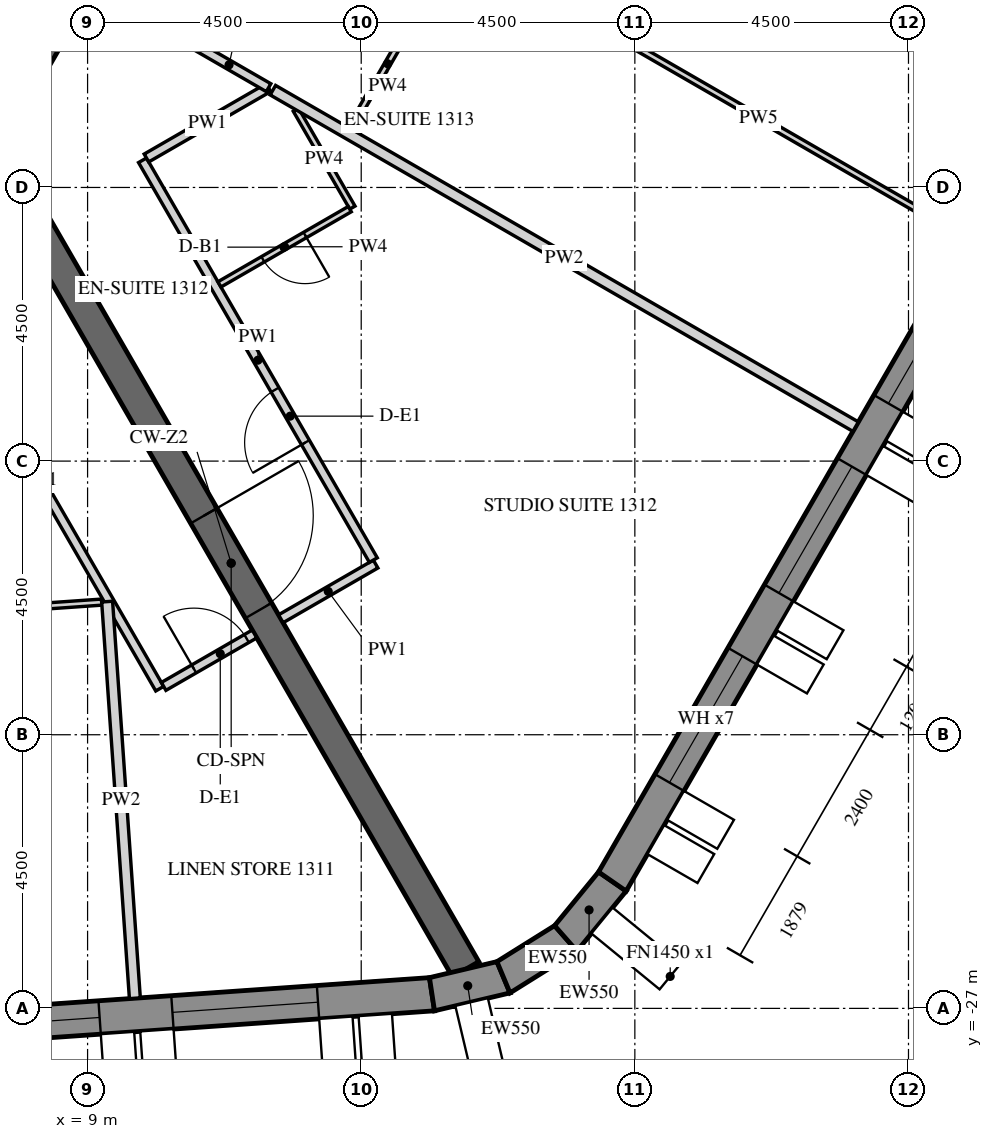
"""IFC4 building model, lengths in metres.
Left out: names, types, materials, properties, quantities, classifications, styles, units other than length and angle.
Written with IfcOpenShell. Run it as: python <this file> out.ifc"""

import sys

from ifc_helpers import new_model, si_unit, direction, frame, frame_2d, origin, place, context, subcontext, project, spatial, polyline, rectangle, outline, extrude, element, fill, save


model = new_model("IFC4")
c1 = context("Model", 3, precision=1e-05, world=origin(), true_north=direction((0.0, 1.0)))
c2 = subcontext(c1, "Body", "Model", "MODEL_VIEW")
j1 = project(units=[si_unit("LENGTHUNIT", "METRE"), si_unit("PLANEANGLEUNIT", "RADIAN")], contexts=[c1])
p1 = place(None, origin())
s1 = spatial("IfcSite", under=j1, at=p1, CompositionType="ELEMENT")
p2 = place(p1, origin())
s2 = spatial("IfcBuilding", under=s1, at=p2, CompositionType="ELEMENT")
p3 = place(p2, frame((0.0, 0.0, 176.1)))
s3 = spatial("IfcBuildingStorey", under=s2, at=p3, CompositionType="ELEMENT", Elevation=176.1)
p4 = place(p3, frame((-13.026, -28.704, -0.15), z_axis=(0.0, 0.0, 1.0), x_axis=(0.99756406806, 0.069756219185, 0.0)))
e1 = element("IfcWall", 1, at=p4, inside=s3, PredefinedType="SOLIDWALL", context=c2, shape_type="SweptSolid", body=[
    extrude(outline(polyline([(-0.026, -0.275), (27.78, -0.275), (27.735, 0.275), (0.026, 0.275), (-0.026, -0.275)])), origin(), (0.0, 0.0, 1.0), 3.9),
])
p5 = place(p4, frame((1.879, 0.0, 1.05)))
e2 = element("IfcOpeningElement", 2, at=p5, cuts=e1, PredefinedType="OPENING", context=c2, shape_type="SweptSolid", body=[
    extrude(rectangle(XDim=2.4, YDim=2.4, at=frame_2d((1.2, 1.2))), frame((0.0, 0.285, 0.0), z_axis=(0.0, -1.0, 0.0), x_axis=(1.0, 0.0, 0.0)), (0.0, 0.0, 1.0), 0.57),
])
p6 = place(p4, frame((5.479, 0.0, 1.05)))
e3 = element("IfcOpeningElement", 3, at=p6, cuts=e1, PredefinedType="OPENING", context=c2, shape_type="SweptSolid", body=[
    extrude(rectangle(XDim=2.4, YDim=2.4, at=frame_2d((1.2, 1.2))), frame((0.0, 0.285, 0.0), z_axis=(0.0, -1.0, 0.0), x_axis=(1.0, 0.0, 0.0)), (0.0, 0.0, 1.0), 0.57),
])
p7 = place(p4, frame((9.079, 0.0, 1.05)))
e4 = element("IfcOpeningElement", 4, at=p7, cuts=e1, PredefinedType="OPENING", context=c2, shape_type="SweptSolid", body=[
    extrude(rectangle(XDim=2.4, YDim=2.4, at=frame_2d((1.2, 1.2))), frame((0.0, 0.285, 0.0), z_axis=(0.0, -1.0, 0.0), x_axis=(1.0, 0.0, 0.0)), (0.0, 0.0, 1.0), 0.57),
])
p8 = place(p4, frame((12.679, 0.0, 1.05)))
e5 = element("IfcOpeningElement", 5, at=p8, cuts=e1, PredefinedType="OPENING", context=c2, shape_type="SweptSolid", body=[
    extrude(rectangle(XDim=2.4, YDim=2.4, at=frame_2d((1.2, 1.2))), frame((0.0, 0.285, 0.0), z_axis=(0.0, -1.0, 0.0), x_axis=(1.0, 0.0, 0.0)), (0.0, 0.0, 1.0), 0.57),
])
p9 = place(p4, frame((16.279, 0.0, 1.05)))
e6 = element("IfcOpeningElement", 6, at=p9, cuts=e1, PredefinedType="OPENING", context=c2, shape_type="SweptSolid", body=[
    extrude(rectangle(XDim=2.4, YDim=2.4, at=frame_2d((1.2, 1.2))), frame((0.0, 0.285, 0.0), z_axis=(0.0, -1.0, 0.0), x_axis=(1.0, 0.0, 0.0)), (0.0, 0.0, 1.0), 0.57),
])
p10 = place(p4, frame((19.879, 0.0, 1.05)))
e7 = element("IfcOpeningElement", 7, at=p10, cuts=e1, PredefinedType="OPENING", context=c2, shape_type="SweptSolid", body=[
    extrude(rectangle(XDim=2.4, YDim=2.4, at=frame_2d((1.2, 1.2))), frame((0.0, 0.285, 0.0), z_axis=(0.0, -1.0, 0.0), x_axis=(1.0, 0.0, 0.0)), (0.0, 0.0, 1.0), 0.57),
])
p11 = place(p4, frame((23.479, 0.0, 1.05)))
e8 = element("IfcOpeningElement", 8, at=p11, cuts=e1, PredefinedType="OPENING", context=c2, shape_type="SweptSolid", body=[
    extrude(rectangle(XDim=2.4, YDim=2.4, at=frame_2d((1.2, 1.2))), frame((0.0, 0.285, 0.0), z_axis=(0.0, -1.0, 0.0), x_axis=(1.0, 0.0, 0.0)), (0.0, 0.0, 1.0), 0.57),
])
p12 = place(p3, frame((14.664, -26.767, -0.15), z_axis=(0.0, 0.0, 1.0), x_axis=(0.973063591128, 0.230536868247, 0.0)))
e9 = element("IfcWall", 9, at=p12, inside=s3, PredefinedType="SOLIDWALL", context=c2, shape_type="SweptSolid", body=[
    extrude(outline(polyline([(-0.022, -0.275), (1.253, -0.275), (1.163, 0.275), (0.022, 0.275), (-0.022, -0.275)])), origin(), (0.0, 0.0, 1.0), 3.9),
])
p13 = place(p3, frame((15.84, -26.489, -0.15), z_axis=(0.0, 0.0, 1.0), x_axis=(0.848009655012, 0.52998077796, 0.0)))
e10 = element("IfcWall", 10, at=p13, inside=s3, PredefinedType="SOLIDWALL", context=c2, shape_type="SweptSolid", body=[
    extrude(outline(polyline([(-0.045, -0.275), (1.253, -0.275), (1.163, 0.275), (0.045, 0.275), (-0.045, -0.275)])), origin(), (0.0, 0.0, 1.0), 3.9),
])
p14 = place(p3, frame((16.864, -25.848, -0.15), z_axis=(0.0, 0.0, 1.0), x_axis=(0.633842757806, 0.773461930787, 0.0)))
e11 = element("IfcWall", 11, at=p14, inside=s3, PredefinedType="SOLIDWALL", context=c2, shape_type="SweptSolid", body=[
    extrude(outline(polyline([(-0.045, -0.275), (1.231, -0.275), (1.186, 0.275), (0.045, 0.275), (-0.045, -0.275)])), origin(), (0.0, 0.0, 1.0), 3.9),
])
p15 = place(p3, frame((17.63, -24.914, -0.15), z_axis=(0.0, 0.0, 1.0), x_axis=(0.499998569178, 0.866026229868, 0.0)))
e12 = element("IfcWall", 12, at=p15, inside=s3, PredefinedType="SOLIDWALL", context=c2, shape_type="SweptSolid", body=[
    extrude(outline(polyline([(-0.022, -0.275), (27.783, -0.275), (27.732, 0.275), (0.022, 0.275), (-0.022, -0.275)])), origin(), (0.0, 0.0, 1.0), 3.9),
])
p16 = place(p15, frame((1.879, 0.0, 1.05)))
e13 = element("IfcOpeningElement", 13, at=p16, cuts=e12, PredefinedType="OPENING", context=c2, shape_type="SweptSolid", body=[
    extrude(rectangle(XDim=2.4, YDim=2.4, at=frame_2d((1.2, 1.2))), frame((0.0, 0.285, 0.0), z_axis=(0.0, -1.0, 0.0), x_axis=(1.0, 0.0, 0.0)), (0.0, 0.0, 1.0), 0.57),
])
p17 = place(p15, frame((5.479, 0.0, 1.05)))
e14 = element("IfcOpeningElement", 14, at=p17, cuts=e12, PredefinedType="OPENING", context=c2, shape_type="SweptSolid", body=[
    extrude(rectangle(XDim=2.4, YDim=2.4, at=frame_2d((1.2, 1.2))), frame((0.0, 0.285, 0.0), z_axis=(0.0, -1.0, 0.0), x_axis=(1.0, 0.0, 0.0)), (0.0, 0.0, 1.0), 0.57),
])
p18 = place(p15, frame((9.079, 0.0, 1.05)))
e15 = element("IfcOpeningElement", 15, at=p18, cuts=e12, PredefinedType="OPENING", context=c2, shape_type="SweptSolid", body=[
    extrude(rectangle(XDim=2.4, YDim=2.4, at=frame_2d((1.2, 1.2))), frame((0.0, 0.285, 0.0), z_axis=(0.0, -1.0, 0.0), x_axis=(1.0, 0.0, 0.0)), (0.0, 0.0, 1.0), 0.57),
])
p19 = place(p15, frame((12.679, 0.0, 1.05)))
e16 = element("IfcOpeningElement", 16, at=p19, cuts=e12, PredefinedType="OPENING", context=c2, shape_type="SweptSolid", body=[
    extrude(rectangle(XDim=2.4, YDim=2.4, at=frame_2d((1.2, 1.2))), frame((0.0, 0.285, 0.0), z_axis=(0.0, -1.0, 0.0), x_axis=(1.0, 0.0, 0.0)), (0.0, 0.0, 1.0), 0.57),
])
p20 = place(p15, frame((16.279, 0.0, 1.05)))
e17 = element("IfcOpeningElement", 17, at=p20, cuts=e12, PredefinedType="OPENING", context=c2, shape_type="SweptSolid", body=[
    extrude(rectangle(XDim=2.4, YDim=2.4, at=frame_2d((1.2, 1.2))), frame((0.0, 0.285, 0.0), z_axis=(0.0, -1.0, 0.0), x_axis=(1.0, 0.0, 0.0)), (0.0, 0.0, 1.0), 0.57),
])
p21 = place(p15, frame((19.879, 0.0, 1.05)))
e18 = element("IfcOpeningElement", 18, at=p21, cuts=e12, PredefinedType="OPENING", context=c2, shape_type="SweptSolid", body=[
    extrude(rectangle(XDim=2.4, YDim=2.4, at=frame_2d((1.2, 1.2))), frame((0.0, 0.285, 0.0), z_axis=(0.0, -1.0, 0.0), x_axis=(1.0, 0.0, 0.0)), (0.0, 0.0, 1.0), 0.57),
])
p22 = place(p15, frame((23.479, 0.0, 1.05)))
e19 = element("IfcOpeningElement", 19, at=p22, cuts=e12, PredefinedType="OPENING", context=c2, shape_type="SweptSolid", body=[
    extrude(rectangle(XDim=2.4, YDim=2.4, at=frame_2d((1.2, 1.2))), frame((0.0, 0.285, 0.0), z_axis=(0.0, -1.0, 0.0), x_axis=(1.0, 0.0, 0.0)), (0.0, 0.0, 1.0), 0.57),
])
p23 = place(p3, frame((7.361, -12.75, -0.15), z_axis=(0.0, 0.0, 1.0), x_axis=(0.50000571537, 0.866022103989, 0.0)))
e20 = element("IfcWall", 20, at=p23, inside=s3, PredefinedType="SHEAR", context=c2, shape_type="SweptSolid", body=[
    extrude(outline(polyline([(-0.144, -0.25), (14.867, -0.25), (14.578, 0.25), (0.144, 0.25), (-0.144, -0.25)])), origin(), (0.0, 0.0, 1.0), 3.9),
])
p24 = place(p23, frame((6.49, 0.0, 0.15)))
e21 = element("IfcOpeningElement", 21, at=p24, cuts=e20, PredefinedType="OPENING", context=c2, shape_type="SweptSolid", body=[
    extrude(rectangle(XDim=1.8, YDim=2.4, at=frame_2d((0.9, 1.2))), frame((0.0, 0.26, 0.0), z_axis=(0.0, -1.0, 0.0), x_axis=(1.0, 0.0, 0.0)), (0.0, 0.0, 1.0), 0.52),
])
p25 = place(p3, frame((7.506, -13.0, -0.15), z_axis=(0.0, 0.0, 1.0), x_axis=(0.499988271576, -0.866032175087, 0.0)))
e22 = element("IfcWall", 22, at=p25, inside=s3, PredefinedType="SHEAR", context=c2, shape_type="SweptSolid", body=[
    extrude(rectangle(XDim=15.424, YDim=0.5, at=frame_2d((7.712, 0.0))), origin(), (0.0, 0.0, 1.0), 3.9),
])
p26 = place(p25, frame((6.812, 0.0, 0.15)))
e23 = element("IfcOpeningElement", 23, at=p26, cuts=e22, PredefinedType="OPENING", context=c2, shape_type="SweptSolid", body=[
    extrude(rectangle(XDim=1.8, YDim=2.4, at=frame_2d((0.9, 1.2))), frame((0.0, 0.26, 0.0), z_axis=(0.0, -1.0, 0.0), x_axis=(1.0, 0.0, 0.0)), (0.0, 0.0, 1.0), 0.52),
])
p27 = place(p3, frame((6.221, -14.875, 0.0), z_axis=(0.0, 0.0, 1.0), x_axis=(0.499989830942, -0.866031274813, 0.0)))
e24 = element("IfcWall", 24, at=p27, inside=s3, PredefinedType="PARTITIONING", context=c2, shape_type="SweptSolid", body=[
    extrude(rectangle(XDim=7.93, YDim=0.15, at=frame_2d((3.965, 0.0))), origin(), (0.0, 0.0, 1.0), 2.988),
])
p28 = place(p3, frame((10.251, -21.705, 0.0), z_axis=(0.0, 0.0, 1.0), x_axis=(0.866013532718, 0.500020560727, 0.0)))
e25 = element("IfcWall", 25, at=p28, inside=s3, PredefinedType="PARTITIONING", context=c2, shape_type="SweptSolid", body=[
    extrude(rectangle(XDim=1.725, YDim=0.15, at=frame_2d((0.863, 0.0))), origin(), (0.0, 0.0, 1.0), 2.988),
])
p29 = place(p28, frame((0.575, 0.0, 0.0)))
e26 = element("IfcOpeningElement", 26, at=p29, cuts=e25, PredefinedType="OPENING", context=c2, shape_type="SweptSolid", body=[
    extrude(rectangle(XDim=1.0, YDim=2.1, at=frame_2d((0.5, 1.05))), frame((0.0, 0.085, 0.0), z_axis=(0.0, -1.0, 0.0), x_axis=(1.0, 0.0, 0.0)), (0.0, 0.0, 1.0), 0.17),
])
p30 = place(p3, frame((12.178, -20.593, 0.0), z_axis=(0.0, 0.0, 1.0), x_axis=(0.866047807691, 0.499961193289, 0.0)))
e27 = element("IfcWall", 27, at=p30, inside=s3, PredefinedType="PARTITIONING", context=c2, shape_type="SweptSolid", body=[
    extrude(rectangle(XDim=1.8, YDim=0.15, at=frame_2d((0.9, 0.0))), origin(), (0.0, 0.0, 1.0), 2.988),
])
p31 = place(p3, frame((13.699, -19.628, 0.0), z_axis=(0.0, 0.0, 1.0), x_axis=(-0.499998968938, 0.866025999068, 0.0)))
e28 = element("IfcWall", 28, at=p31, inside=s3, PredefinedType="PARTITIONING", context=c2, shape_type="SweptSolid", body=[
    extrude(rectangle(XDim=7.592, YDim=0.15, at=frame_2d((3.796, 0.0))), origin(), (0.0, 0.0, 1.0), 2.988),
])
p32 = place(p31, frame((2.233, 0.0, 0.0)))
e29 = element("IfcOpeningElement", 29, at=p32, cuts=e28, PredefinedType="OPENING", context=c2, shape_type="SweptSolid", body=[
    extrude(rectangle(XDim=1.0, YDim=2.1, at=frame_2d((0.5, 1.05))), frame((0.0, 0.085, 0.0), z_axis=(0.0, -1.0, 0.0), x_axis=(1.0, 0.0, 0.0)), (0.0, 0.0, 1.0), 0.17),
])
p33 = place(p3, frame((9.968, -13.016, 0.0), z_axis=(0.0, 0.0, 1.0), x_axis=(0.866022320763, 0.500005339912, 0.0)))
e30 = element("IfcWall", 30, at=p33, inside=s3, PredefinedType="PARTITIONING", context=c2, shape_type="SweptSolid", body=[
    extrude(rectangle(XDim=2.316, YDim=0.15, at=frame_2d((1.158, 0.0))), origin(), (0.0, 0.0, 1.0), 2.988),
])
p34 = place(p3, frame((11.977, -11.859, 0.0), z_axis=(0.0, 0.0, 1.0), x_axis=(-0.865993364801, 0.500055489042, 0.0)))
e31 = element("IfcWall", 31, at=p34, inside=s3, PredefinedType="PARTITIONING", context=c2, shape_type="SweptSolid", body=[
    extrude(rectangle(XDim=1.502, YDim=0.15, at=frame_2d((0.751, 0.0))), origin(), (0.0, 0.0, 1.0), 2.988),
])
p35 = place(p3, frame((2.189, -20.812, 0.0), z_axis=(0.0, 0.0, 1.0), x_axis=(0.997564480369, 0.06975032263, 0.0)))
e32 = element("IfcWall", 32, at=p35, inside=s3, PredefinedType="PARTITIONING", context=c2, shape_type="SweptSolid", body=[
    extrude(rectangle(XDim=7.06, YDim=0.1, at=frame_2d((3.53, 0.0))), origin(), (0.0, 0.0, 1.0), 2.988),
])
p36 = place(p35, frame((3.1, 0.0, 0.0)))
e33 = element("IfcOpeningElement", 33, at=p36, cuts=e32, PredefinedType="OPENING", context=c2, shape_type="SweptSolid", body=[
    extrude(rectangle(XDim=0.9, YDim=2.1, at=frame_2d((0.45, 1.05))), frame((0.0, 0.06, 0.0), z_axis=(0.0, -1.0, 0.0), x_axis=(1.0, 0.0, 0.0)), (0.0, 0.0, 1.0), 0.12),
])
p37 = place(p3, frame((9.778, -26.833, 0.0), z_axis=(0.0, 0.0, 1.0), x_axis=(-0.069750353544, 0.997564478207, 0.0)))
e34 = element("IfcWall", 34, at=p37, inside=s3, PredefinedType="PARTITIONING", context=c2, shape_type="SweptSolid", body=[
    extrude(rectangle(XDim=6.538, YDim=0.18, at=frame_2d((3.269, 0.0))), origin(), (0.0, 0.0, 1.0), 2.988),
])
p38 = place(p3, frame((12.426, -12.223, 0.0), z_axis=(0.0, 0.0, 1.0), x_axis=(0.499927229454, -0.866067413802, 0.0)))
e35 = element("IfcWall", 35, at=p38, inside=s3, PredefinedType="PARTITIONING", context=c2, shape_type="SweptSolid", body=[
    extrude(rectangle(XDim=1.858, YDim=0.1, at=frame_2d((0.929, 0.0))), origin(), (0.0, 0.0, 1.0), 2.988),
])
p39 = place(p3, frame((13.312, -13.857, 0.0), z_axis=(0.0, 0.0, 1.0), x_axis=(-0.866073894602, -0.499916002032, 0.0)))
e36 = element("IfcWall", 36, at=p39, inside=s3, PredefinedType="PARTITIONING", context=c2, shape_type="SweptSolid", body=[
    extrude(rectangle(XDim=2.475, YDim=0.1, at=frame_2d((1.238, 0.0))), origin(), (0.0, 0.0, 1.0), 2.988),
])
p40 = place(p39, frame((0.85, 0.0, 0.0)))
e37 = element("IfcOpeningElement", 37, at=p40, cuts=e36, PredefinedType="OPENING", context=c2, shape_type="SweptSolid", body=[
    extrude(rectangle(XDim=0.8, YDim=2.1, at=frame_2d((0.4, 1.05))), frame((0.0, 0.06, 0.0), z_axis=(0.0, -1.0, 0.0), x_axis=(1.0, 0.0, 0.0)), (0.0, 0.0, 1.0), 0.12),
])
p41 = place(p3, frame((21.631, -17.433, 0.0), z_axis=(0.0, 0.0, 1.0), x_axis=(-0.866031296205, 0.499989793889, 0.0)))
e38 = element("IfcWall", 38, at=p41, inside=s3, PredefinedType="PARTITIONING", context=c2, shape_type="SweptSolid", body=[
    extrude(rectangle(XDim=11.067, YDim=0.18, at=frame_2d((5.534, 0.0))), origin(), (0.0, 0.0, 1.0), 2.988),
])
p42 = place(p3, frame((14.549, -10.4, 0.0), z_axis=(0.0, 0.0, 1.0), x_axis=(-0.500003092839, -0.866023618125, 0.0)))
e39 = element("IfcWall", 39, at=p42, inside=s3, PredefinedType="PARTITIONING", context=c2, shape_type="SweptSolid", body=[
    extrude(rectangle(XDim=2.46, YDim=0.1, at=frame_2d((1.23, 0.0))), origin(), (0.0, 0.0, 1.0), 2.988),
])
p43 = place(p3, frame((23.431, -14.316, 0.0), z_axis=(0.0, 0.0, 1.0), x_axis=(-0.86602399778, 0.500002435262, 0.0)))
e40 = element("IfcWall", 40, at=p43, inside=s3, PredefinedType="PARTITIONING", context=c2, shape_type="SweptSolid", body=[
    extrude(rectangle(XDim=7.85, YDim=0.1, at=frame_2d((3.925, 0.0))), origin(), (0.0, 0.0, 1.0), 2.988),
])
p44 = place(p10, frame((0.0, 0.205, 0.0)))
e41 = element("IfcWindow", 41, at=p44, inside=s3, PartitioningType="DOUBLE_PANEL_VERTICAL", PredefinedType="WINDOW", context=c2, shape_type="SweptSolid", body=[
    extrude(rectangle(XDim=2.4, YDim=2.4, at=frame_2d((1.2, 1.2))), frame((0.0, 0.03, 0.0), z_axis=(0.0, -1.0, 0.0), x_axis=(1.0, 0.0, 0.0)), (0.0, 0.0, 1.0), 0.06),
])
fill(e7, e41)
p45 = place(p11, frame((0.0, 0.205, 0.0)))
e42 = element("IfcWindow", 42, at=p45, inside=s3, PartitioningType="DOUBLE_PANEL_VERTICAL", PredefinedType="WINDOW", context=c2, shape_type="SweptSolid", body=[
    extrude(rectangle(XDim=2.4, YDim=2.4, at=frame_2d((1.2, 1.2))), frame((0.0, 0.03, 0.0), z_axis=(0.0, -1.0, 0.0), x_axis=(1.0, 0.0, 0.0)), (0.0, 0.0, 1.0), 0.06),
])
fill(e8, e42)
p46 = place(p16, frame((0.0, 0.205, 0.0)))
e43 = element("IfcWindow", 43, at=p46, inside=s3, PartitioningType="DOUBLE_PANEL_VERTICAL", PredefinedType="WINDOW", context=c2, shape_type="SweptSolid", body=[
    extrude(rectangle(XDim=2.4, YDim=2.4, at=frame_2d((1.2, 1.2))), frame((0.0, 0.03, 0.0), z_axis=(0.0, -1.0, 0.0), x_axis=(1.0, 0.0, 0.0)), (0.0, 0.0, 1.0), 0.06),
])
fill(e13, e43)
p47 = place(p17, frame((0.0, 0.205, 0.0)))
e44 = element("IfcWindow", 44, at=p47, inside=s3, PartitioningType="DOUBLE_PANEL_VERTICAL", PredefinedType="WINDOW", context=c2, shape_type="SweptSolid", body=[
    extrude(rectangle(XDim=2.4, YDim=2.4, at=frame_2d((1.2, 1.2))), frame((0.0, 0.03, 0.0), z_axis=(0.0, -1.0, 0.0), x_axis=(1.0, 0.0, 0.0)), (0.0, 0.0, 1.0), 0.06),
])
fill(e14, e44)
p48 = place(p18, frame((0.0, 0.205, 0.0)))
e45 = element("IfcWindow", 45, at=p48, inside=s3, PartitioningType="DOUBLE_PANEL_VERTICAL", PredefinedType="WINDOW", context=c2, shape_type="SweptSolid", body=[
    extrude(rectangle(XDim=2.4, YDim=2.4, at=frame_2d((1.2, 1.2))), frame((0.0, 0.03, 0.0), z_axis=(0.0, -1.0, 0.0), x_axis=(1.0, 0.0, 0.0)), (0.0, 0.0, 1.0), 0.06),
])
fill(e15, e45)
p49 = place(p26, origin())
e46 = element("IfcDoor", 46, at=p49, inside=s3, OperationType="DOUBLE_DOOR_SINGLE_SWING", PredefinedType="DOOR", context=c2, shape_type="SweptSolid", body=[
    extrude(rectangle(XDim=1.8, YDim=2.4, at=frame_2d((0.9, 1.2))), frame((0.0, 0.025, 0.0), z_axis=(0.0, -1.0, 0.0), x_axis=(1.0, 0.0, 0.0)), (0.0, 0.0, 1.0), 0.05),
])
fill(e23, e46)
p50 = place(p29, origin())
e47 = element("IfcDoor", 47, at=p50, inside=s3, OperationType="SINGLE_SWING_LEFT", PredefinedType="DOOR", context=c2, shape_type="SweptSolid", body=[
    extrude(rectangle(XDim=1.0, YDim=2.1, at=frame_2d((0.5, 1.05))), frame((0.0, 0.025, 0.0), z_axis=(0.0, -1.0, 0.0), x_axis=(1.0, 0.0, 0.0)), (0.0, 0.0, 1.0), 0.05),
])
fill(e26, e47)
p51 = place(p32, origin())
e48 = element("IfcDoor", 48, at=p51, inside=s3, OperationType="SINGLE_SWING_LEFT", PredefinedType="DOOR", context=c2, shape_type="SweptSolid", body=[
    extrude(rectangle(XDim=1.0, YDim=2.1, at=frame_2d((0.5, 1.05))), frame((0.0, 0.025, 0.0), z_axis=(0.0, -1.0, 0.0), x_axis=(1.0, 0.0, 0.0)), (0.0, 0.0, 1.0), 0.05),
])
fill(e29, e48)
p52 = place(p40, origin())
e49 = element("IfcDoor", 49, at=p52, inside=s3, OperationType="SINGLE_SWING_LEFT", PredefinedType="DOOR", context=c2, shape_type="SweptSolid", body=[
    extrude(rectangle(XDim=0.8, YDim=2.1, at=frame_2d((0.4, 1.05))), frame((0.0, 0.025, 0.0), z_axis=(0.0, -1.0, 0.0), x_axis=(1.0, 0.0, 0.0)), (0.0, 0.0, 1.0), 0.05),
])
fill(e37, e49)
save(model, sys.argv[1])
